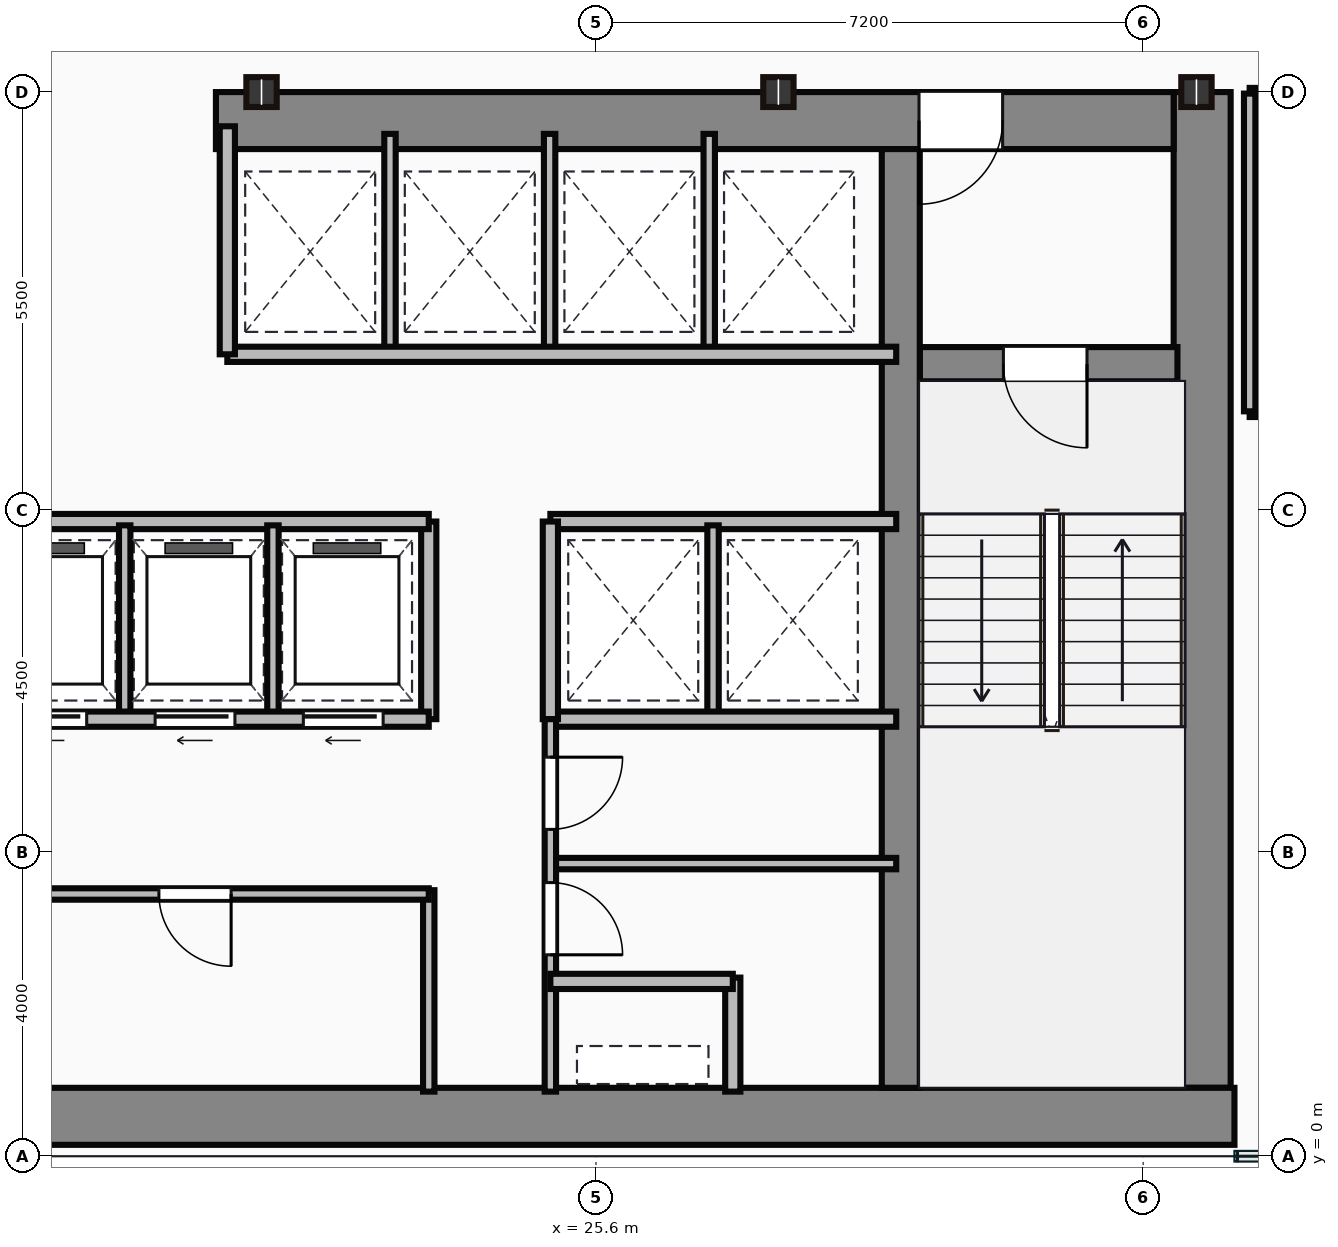
"""IFC4 building model, lengths in metres.
Left out: names, types, materials, properties, quantities, classifications, styles, units other than length and angle.
Written with IfcOpenShell. Run it as: python <this file> out.ifc"""

import sys

from ifc_helpers import new_model, si_unit, direction, frame, frame_2d, origin, origin_2d, place, context, subcontext, project, spatial, rectangle, i_section, extrude, source, transform, mapped, element, fill, save


model = new_model("IFC4")
c1 = context("Model", 3, precision=1e-05, world=origin(), true_north=direction((0.0, 1.0)))
c2 = subcontext(c1, "Body", "Model", "MODEL_VIEW")
j1 = project(units=[si_unit("LENGTHUNIT", "METRE"), si_unit("PLANEANGLEUNIT", "RADIAN")], contexts=[c1])
p1 = place(None, origin())
s1 = spatial("IfcSite", under=j1, at=p1, CompositionType="ELEMENT")
p2 = place(p1, origin())
s2 = spatial("IfcBuilding", under=s1, at=p2, CompositionType="ELEMENT")
p3 = place(p2, frame((0.0, 0.0, 95.95)))
s3 = spatial("IfcBuildingStorey", under=s2, at=p3, CompositionType="ELEMENT", Elevation=95.95)
m1 = source(origin(), c2, "Body", "SweptSolid", [
    extrude(rectangle(XDim=29.5, YDim=0.75, at=frame_2d((14.75, 0.0))), origin(), (0.0, 0.0, 1.0), 3.65),
])
p4 = place(p3, frame((4.5, 0.525, 0.0), z_axis=(0.0, 0.0, 1.0), x_axis=(1.0, 0.0, 0.0)))
e1 = element("IfcWall", 1, at=p4, inside=s3, PredefinedType="SHEAR", context=c2, shape_type="MappedRepresentation", body=[
    mapped(m1, transform((0.0, 0.0, 0.0))),
])
m2 = source(origin(), c2, "Body", "SweptSolid", [
    extrude(rectangle(XDim=13.1, YDim=0.75, at=frame_2d((6.55, 0.0))), origin(), (0.0, 0.0, 1.0), 3.65),
])
p5 = place(p3, frame((33.575, 0.9, 0.0), z_axis=(0.0, 0.0, 1.0), x_axis=(0.0, 1.0, 0.0)))
e2 = element("IfcWall", 2, at=p5, inside=s3, PredefinedType="SHEAR", context=c2, shape_type="MappedRepresentation", body=[
    mapped(m2, transform((0.0, 0.0, 0.0))),
])
m3 = source(origin(), c2, "Body", "SweptSolid", [
    extrude(rectangle(XDim=12.6, YDim=0.75, at=frame_2d((6.3, 0.0))), origin(), (0.0, 0.0, 1.0), 3.65),
])
p6 = place(p3, frame((20.6, 13.625, 0.0), z_axis=(0.0, 0.0, 1.0), x_axis=(1.0, 0.0, 0.0)))
e3 = element("IfcWall", 3, at=p6, inside=s3, PredefinedType="SHEAR", context=c2, shape_type="MappedRepresentation", body=[
    mapped(m3, transform((0.0, 0.0, 0.0))),
])
p7 = place(p6, frame((9.25, 0.0, 0.0)))
e4 = element("IfcOpeningElement", 4, at=p7, cuts=e3, PredefinedType="OPENING", context=c2, shape_type="SweptSolid", body=[
    extrude(rectangle(XDim=1.1, YDim=2.15, at=frame_2d((0.55, 1.075))), frame((0.0, 0.385, 0.0), z_axis=(0.0, -1.0, 0.0), x_axis=(1.0, 0.0, 0.0)), (0.0, 0.0, 1.0), 0.77),
])
m4 = source(origin(), c2, "Body", "SweptSolid", [
    extrude(rectangle(XDim=12.35, YDim=0.5, at=frame_2d((6.175, 0.0))), origin(), (0.0, 0.0, 1.0), 3.65),
])
p8 = place(p3, frame((29.61, 0.9, 0.0), z_axis=(0.0, 0.0, 1.0), x_axis=(0.0, 1.0, 0.0)))
e5 = element("IfcWall", 5, at=p8, inside=s3, PredefinedType="SHEAR", context=c2, shape_type="MappedRepresentation", body=[
    mapped(m4, transform((0.0, 0.0, 0.0))),
])
m5 = source(origin(), c2, "Body", "SweptSolid", [
    extrude(rectangle(XDim=3.39, YDim=0.45, at=frame_2d((1.695, 0.0))), origin(), (0.0, 0.0, 1.0), 3.65),
])
p9 = place(p3, frame((29.86, 10.42, 0.0), z_axis=(0.0, 0.0, 1.0), x_axis=(1.0, 0.0, 0.0)))
e6 = element("IfcWall", 6, at=p9, inside=s3, PredefinedType="SHEAR", context=c2, shape_type="MappedRepresentation", body=[
    mapped(m5, transform((0.0, 0.0, 0.0))),
])
p10 = place(p9, frame((1.1, 0.0, 0.0)))
e7 = element("IfcOpeningElement", 7, at=p10, cuts=e6, PredefinedType="OPENING", context=c2, shape_type="SweptSolid", body=[
    extrude(rectangle(XDim=1.1, YDim=2.15, at=frame_2d((0.55, 1.075))), frame((0.0, 0.235, 0.0), z_axis=(0.0, -1.0, 0.0), x_axis=(1.0, 0.0, 0.0)), (0.0, 0.0, 1.0), 0.47),
])
m6 = source(origin(), c2, "Body", "SweptSolid", [
    extrude(i_section(OverallWidth=0.399, OverallDepth=0.393, WebThickness=0.023, FlangeThickness=0.037, at=origin_2d()), origin(), (0.0, 0.0, 1.0), 3.65),
])
for number, where, z_axis, x_axis in (
    (8, (21.2, 14.0, 0.0), (0.0, 0.0, 1.0), (1.0, 0.0, 0.0)),
    (9, (28.0, 14.0, 0.0), (0.0, 0.0, 1.0), (1.0, 0.0, 0.0)),
    (10, (33.5, 14.0, 0.0), (0.0, 0.0, 1.0), (1.0, 0.0, 0.0)),
):
    element("IfcColumn", number, at=place(p3, frame(where, z_axis=z_axis, x_axis=x_axis)), inside=s3, PredefinedType="COLUMN", context=c2, shape_type="MappedRepresentation", body=[
        mapped(m6, transform((0.0, 0.0, 0.0))),
    ])
m7 = source(origin(), c2, "Body", "SweptSolid", [
    extrude(rectangle(XDim=10.35, YDim=0.15, at=frame_2d((5.175, 0.0))), origin(), (0.0, 0.0, 1.0), 3.4),
])
p11 = place(p3, frame((13.05, 3.45, 0.0), z_axis=(0.0, 0.0, 1.0), x_axis=(1.0, 0.0, 0.0)))
e11 = element("IfcWall", 11, at=p11, inside=s3, PredefinedType="PARTITIONING", context=c2, shape_type="MappedRepresentation", body=[
    mapped(m7, transform((0.0, 0.0, 0.0))),
])
p12 = place(p11, frame((2.1, 0.0, 0.0)))
e12 = element("IfcOpeningElement", 12, at=p12, cuts=e11, PredefinedType="OPENING", context=c2, shape_type="SweptSolid", body=[
    extrude(rectangle(XDim=0.95, YDim=2.15, at=frame_2d((0.475, 1.075))), frame((0.0, 0.085, 0.0), z_axis=(0.0, -1.0, 0.0), x_axis=(1.0, 0.0, 0.0)), (0.0, 0.0, 1.0), 0.17),
])
p13 = place(p11, frame((6.8, 0.0, 0.0)))
e13 = element("IfcOpeningElement", 13, at=p13, cuts=e11, PredefinedType="OPENING", context=c2, shape_type="SweptSolid", body=[
    extrude(rectangle(XDim=0.95, YDim=2.15, at=frame_2d((0.475, 1.075))), frame((0.0, 0.085, 0.0), z_axis=(0.0, -1.0, 0.0), x_axis=(1.0, 0.0, 0.0)), (0.0, 0.0, 1.0), 0.17),
])
m8 = source(origin(), c2, "Body", "SweptSolid", [
    extrude(rectangle(XDim=2.65, YDim=0.15, at=frame_2d((1.325, 0.0))), origin(), (0.0, 0.0, 1.0), 3.4),
])
p14 = place(p3, frame((23.4, 0.85, 0.0), z_axis=(0.0, 0.0, 1.0), x_axis=(0.0, 1.0, 0.0)))
e14 = element("IfcWall", 14, at=p14, inside=s3, PredefinedType="PARTITIONING", context=c2, shape_type="MappedRepresentation", body=[
    mapped(m8, transform((0.0, 0.0, 0.0))),
])
m9 = source(origin(), c2, "Body", "SweptSolid", [
    extrude(rectangle(XDim=11.85, YDim=0.2, at=frame_2d((5.925, 0.0))), origin(), (0.0, 0.0, 1.0), 3.4),
])
p15 = place(p3, frame((11.55, 5.75, 0.0), z_axis=(0.0, 0.0, 1.0), x_axis=(1.0, 0.0, 0.0)))
e15 = element("IfcWall", 15, at=p15, inside=s3, PredefinedType="PARTITIONING", context=c2, shape_type="MappedRepresentation", body=[
    mapped(m9, transform((0.0, 0.0, 0.0))),
])
p16 = place(p15, frame((0.45, 0.0, 0.0)))
e16 = element("IfcOpeningElement", 16, at=p16, cuts=e15, PredefinedType="OPENING", context=c2, shape_type="SweptSolid", body=[
    extrude(rectangle(XDim=1.05, YDim=2.15, at=frame_2d((0.525, 1.075))), frame((0.0, 0.11, 0.0), z_axis=(0.0, -1.0, 0.0), x_axis=(1.0, 0.0, 0.0)), (0.0, 0.0, 1.0), 0.22),
])
p17 = place(p15, frame((2.4, 0.0, 0.0)))
e17 = element("IfcOpeningElement", 17, at=p17, cuts=e15, PredefinedType="OPENING", context=c2, shape_type="SweptSolid", body=[
    extrude(rectangle(XDim=1.05, YDim=2.15, at=frame_2d((0.525, 1.075))), frame((0.0, 0.11, 0.0), z_axis=(0.0, -1.0, 0.0), x_axis=(1.0, 0.0, 0.0)), (0.0, 0.0, 1.0), 0.22),
])
p18 = place(p15, frame((4.35, 0.0, 0.0)))
e18 = element("IfcOpeningElement", 18, at=p18, cuts=e15, PredefinedType="OPENING", context=c2, shape_type="SweptSolid", body=[
    extrude(rectangle(XDim=1.05, YDim=2.15, at=frame_2d((0.525, 1.075))), frame((0.0, 0.11, 0.0), z_axis=(0.0, -1.0, 0.0), x_axis=(1.0, 0.0, 0.0)), (0.0, 0.0, 1.0), 0.22),
])
p19 = place(p15, frame((6.3, 0.0, 0.0)))
e19 = element("IfcOpeningElement", 19, at=p19, cuts=e15, PredefinedType="OPENING", context=c2, shape_type="SweptSolid", body=[
    extrude(rectangle(XDim=1.05, YDim=2.15, at=frame_2d((0.525, 1.075))), frame((0.0, 0.11, 0.0), z_axis=(0.0, -1.0, 0.0), x_axis=(1.0, 0.0, 0.0)), (0.0, 0.0, 1.0), 0.22),
])
p20 = place(p15, frame((8.25, 0.0, 0.0)))
e20 = element("IfcOpeningElement", 20, at=p20, cuts=e15, PredefinedType="OPENING", context=c2, shape_type="SweptSolid", body=[
    extrude(rectangle(XDim=1.05, YDim=2.15, at=frame_2d((0.525, 1.075))), frame((0.0, 0.11, 0.0), z_axis=(0.0, -1.0, 0.0), x_axis=(1.0, 0.0, 0.0)), (0.0, 0.0, 1.0), 0.22),
])
p21 = place(p15, frame((10.2, 0.0, 0.0)))
e21 = element("IfcOpeningElement", 21, at=p21, cuts=e15, PredefinedType="OPENING", context=c2, shape_type="SweptSolid", body=[
    extrude(rectangle(XDim=1.05, YDim=2.15, at=frame_2d((0.525, 1.075))), frame((0.0, 0.11, 0.0), z_axis=(0.0, -1.0, 0.0), x_axis=(1.0, 0.0, 0.0)), (0.0, 0.0, 1.0), 0.22),
])
p22 = place(p3, frame((11.55, 8.35, 0.0), z_axis=(0.0, 0.0, 1.0), x_axis=(1.0, 0.0, 0.0)))
e22 = element("IfcWall", 22, at=p22, inside=s3, PredefinedType="PARTITIONING", context=c2, shape_type="MappedRepresentation", body=[
    mapped(m9, transform((0.0, 0.0, 0.0))),
])
m10 = source(origin(), c2, "Body", "SweptSolid", [
    extrude(rectangle(XDim=2.6, YDim=0.2, at=frame_2d((1.3, 0.0))), origin(), (0.0, 0.0, 1.0), 3.4),
])
p23 = place(p3, frame((23.4, 5.75, 0.0), z_axis=(0.0, 0.0, 1.0), x_axis=(0.0, 1.0, 0.0)))
e23 = element("IfcWall", 23, at=p23, inside=s3, PredefinedType="PARTITIONING", context=c2, shape_type="MappedRepresentation", body=[
    mapped(m10, transform((0.0, 0.0, 0.0))),
])
m11 = source(origin(), c2, "Body", "SweptSolid", [
    extrude(rectangle(XDim=2.5, YDim=0.15, at=frame_2d((1.25, 0.0))), origin(), (0.0, 0.0, 1.0), 3.4),
])
for number, where, z_axis, x_axis in (
    (24, (19.4, 5.8, 0.0), (0.0, 0.0, 1.0), (0.0, 1.0, 0.0)),
    (25, (21.35, 5.8, 0.0), (0.0, 0.0, 1.0), (0.0, 1.0, 0.0)),
):
    element("IfcWall", number, at=place(p3, frame(where, z_axis=z_axis, x_axis=x_axis)), inside=s3, PredefinedType="PARTITIONING", context=c2, shape_type="MappedRepresentation", body=[
        mapped(m11, transform((0.0, 0.0, 0.0))),
    ])
m12 = source(origin(), c2, "Body", "SweptSolid", [
    extrude(rectangle(XDim=8.8, YDim=0.2, at=frame_2d((4.4, 0.0))), origin(), (0.0, 0.0, 1.0), 3.4),
])
p24 = place(p3, frame((20.75, 10.55, 0.0), z_axis=(0.0, 0.0, 1.0), x_axis=(1.0, 0.0, 0.0)))
e26 = element("IfcWall", 26, at=p24, inside=s3, PredefinedType="PARTITIONING", context=c2, shape_type="MappedRepresentation", body=[
    mapped(m12, transform((0.0, 0.0, 0.0))),
])
m13 = source(origin(), c2, "Body", "SweptSolid", [
    extrude(rectangle(XDim=3.0, YDim=0.2, at=frame_2d((1.5, 0.0))), origin(), (0.0, 0.0, 1.0), 3.4),
])
p25 = place(p3, frame((20.75, 10.55, 0.0), z_axis=(0.0, 0.0, 1.0), x_axis=(0.0, 1.0, 0.0)))
e27 = element("IfcWall", 27, at=p25, inside=s3, PredefinedType="PARTITIONING", context=c2, shape_type="MappedRepresentation", body=[
    mapped(m13, transform((0.0, 0.0, 0.0))),
])
m14 = source(origin(), c2, "Body", "SweptSolid", [
    extrude(rectangle(XDim=2.85, YDim=0.15, at=frame_2d((1.425, 0.0))), origin(), (0.0, 0.0, 1.0), 3.4),
])
for number, where, z_axis, x_axis in (
    (28, (22.89, 10.6, 0.0), (0.0, 0.0, 1.0), (0.0, 1.0, 0.0)),
    (29, (24.99, 10.6, 0.0), (0.0, 0.0, 1.0), (0.0, 1.0, 0.0)),
    (30, (27.09, 10.6, 0.0), (0.0, 0.0, 1.0), (0.0, 1.0, 0.0)),
):
    element("IfcWall", number, at=place(p3, frame(where, z_axis=z_axis, x_axis=x_axis)), inside=s3, PredefinedType="PARTITIONING", context=c2, shape_type="MappedRepresentation", body=[
        mapped(m14, transform((0.0, 0.0, 0.0))),
    ])
m15 = source(origin(), c2, "Body", "SweptSolid", [
    extrude(rectangle(XDim=4.55, YDim=0.2, at=frame_2d((2.275, 0.0))), origin(), (0.0, 0.0, 1.0), 3.4),
])
for number, where, z_axis, x_axis in (
    (31, (25.0, 8.35, 0.0), (0.0, 0.0, 1.0), (1.0, 0.0, 0.0)),
    (32, (25.0, 5.75, 0.0), (0.0, 0.0, 1.0), (1.0, 0.0, 0.0)),
):
    element("IfcWall", number, at=place(p3, frame(where, z_axis=z_axis, x_axis=x_axis)), inside=s3, PredefinedType="PARTITIONING", context=c2, shape_type="MappedRepresentation", body=[
        mapped(m15, transform((0.0, 0.0, 0.0))),
    ])
p26 = place(p3, frame((25.0, 5.75, 0.0), z_axis=(0.0, 0.0, 1.0), x_axis=(0.0, 1.0, 0.0)))
e33 = element("IfcWall", 33, at=p26, inside=s3, PredefinedType="PARTITIONING", context=c2, shape_type="MappedRepresentation", body=[
    mapped(m10, transform((0.0, 0.0, 0.0))),
])
p27 = place(p3, frame((27.14, 5.8, 0.0), z_axis=(0.0, 0.0, 1.0), x_axis=(0.0, 1.0, 0.0)))
e34 = element("IfcWall", 34, at=p27, inside=s3, PredefinedType="PARTITIONING", context=c2, shape_type="MappedRepresentation", body=[
    mapped(m11, transform((0.0, 0.0, 0.0))),
])
m16 = source(origin(), c2, "Body", "SweptSolid", [
    extrude(rectangle(XDim=4.9, YDim=0.15, at=frame_2d((2.45, 0.0))), origin(), (0.0, 0.0, 1.0), 3.4),
])
p28 = place(p3, frame((25.0, 0.85, 0.0), z_axis=(0.0, 0.0, 1.0), x_axis=(0.0, 1.0, 0.0)))
e35 = element("IfcWall", 35, at=p28, inside=s3, PredefinedType="PARTITIONING", context=c2, shape_type="MappedRepresentation", body=[
    mapped(m16, transform((0.0, 0.0, 0.0))),
])
p29 = place(p28, frame((1.8, 0.0, 0.0)))
e36 = element("IfcOpeningElement", 36, at=p29, cuts=e35, PredefinedType="OPENING", context=c2, shape_type="SweptSolid", body=[
    extrude(rectangle(XDim=0.95, YDim=2.15, at=frame_2d((0.475, 1.075))), frame((0.0, 0.085, 0.0), z_axis=(0.0, -1.0, 0.0), x_axis=(1.0, 0.0, 0.0)), (0.0, 0.0, 1.0), 0.17),
])
p30 = place(p28, frame((3.45, 0.0, 0.0)))
e37 = element("IfcOpeningElement", 37, at=p30, cuts=e35, PredefinedType="OPENING", context=c2, shape_type="SweptSolid", body=[
    extrude(rectangle(XDim=0.95, YDim=2.15, at=frame_2d((0.475, 1.075))), frame((0.0, 0.085, 0.0), z_axis=(0.0, -1.0, 0.0), x_axis=(1.0, 0.0, 0.0)), (0.0, 0.0, 1.0), 0.17),
])
m17 = source(origin(), c2, "Body", "SweptSolid", [
    extrude(rectangle(XDim=2.4, YDim=0.2, at=frame_2d((1.2, 0.0))), origin(), (0.0, 0.0, 1.0), 3.4),
])
p31 = place(p3, frame((25.0, 2.3, 0.0), z_axis=(0.0, 0.0, 1.0), x_axis=(1.0, 0.0, 0.0)))
e38 = element("IfcWall", 38, at=p31, inside=s3, PredefinedType="PARTITIONING", context=c2, shape_type="MappedRepresentation", body=[
    mapped(m17, transform((0.0, 0.0, 0.0))),
])
m18 = source(origin(), c2, "Body", "SweptSolid", [
    extrude(rectangle(XDim=1.5, YDim=0.2, at=frame_2d((0.75, 0.0))), origin(), (0.0, 0.0, 1.0), 3.4),
])
p32 = place(p3, frame((27.4, 0.85, 0.0), z_axis=(0.0, 0.0, 1.0), x_axis=(0.0, 1.0, 0.0)))
e39 = element("IfcWall", 39, at=p32, inside=s3, PredefinedType="PARTITIONING", context=c2, shape_type="MappedRepresentation", body=[
    mapped(m18, transform((0.0, 0.0, 0.0))),
])
m19 = source(origin(), c2, "Body", "SweptSolid", [
    extrude(rectangle(XDim=4.55, YDim=0.15, at=frame_2d((2.275, 0.0))), origin(), (0.0, 0.0, 1.0), 3.4),
])
p33 = place(p3, frame((25.0, 3.85, 0.0), z_axis=(0.0, 0.0, 1.0), x_axis=(1.0, 0.0, 0.0)))
e40 = element("IfcWall", 40, at=p33, inside=s3, PredefinedType="PARTITIONING", context=c2, shape_type="MappedRepresentation", body=[
    mapped(m19, transform((0.0, 0.0, 0.0))),
])
m20 = source(origin(), c2, "Body", "SweptSolid", [
    extrude(rectangle(XDim=4.8, YDim=0.15, at=frame_2d((2.4, 0.0))), origin(), (0.0, 0.0, 1.0), 2.702),
])
p34 = place(p3, frame((34.2, 13.98, 0.0), z_axis=(0.0, 0.0, 1.0), x_axis=(1.0, 0.0, 0.0)))
e41 = element("IfcWall", 41, at=p34, inside=s3, PredefinedType="PARTITIONING", context=c2, shape_type="MappedRepresentation", body=[
    mapped(m20, transform((0.0, 0.0, 0.0))),
])
p35 = place(p34, frame((0.35, 0.0, 0.0)))
e42 = element("IfcOpeningElement", 42, at=p35, cuts=e41, PredefinedType="OPENING", context=c2, shape_type="SweptSolid", body=[
    extrude(rectangle(XDim=0.85, YDim=2.1, at=frame_2d((0.425, 1.05))), frame((0.0, 0.085, 0.0), z_axis=(0.0, -1.0, 0.0), x_axis=(1.0, 0.0, 0.0)), (0.0, 0.0, 1.0), 0.17),
])
p36 = place(p34, frame((1.95, 0.0, 0.0)))
e43 = element("IfcOpeningElement", 43, at=p36, cuts=e41, PredefinedType="OPENING", context=c2, shape_type="SweptSolid", body=[
    extrude(rectangle(XDim=0.85, YDim=2.1, at=frame_2d((0.425, 1.05))), frame((0.0, 0.085, 0.0), z_axis=(0.0, -1.0, 0.0), x_axis=(1.0, 0.0, 0.0)), (0.0, 0.0, 1.0), 0.17),
])
p37 = place(p34, frame((3.5, 0.0, 0.0)))
e44 = element("IfcOpeningElement", 44, at=p37, cuts=e41, PredefinedType="OPENING", context=c2, shape_type="SweptSolid", body=[
    extrude(rectangle(XDim=0.9, YDim=2.1, at=frame_2d((0.45, 1.05))), frame((0.0, 0.085, 0.0), z_axis=(0.0, -1.0, 0.0), x_axis=(1.0, 0.0, 0.0)), (0.0, 0.0, 1.0), 0.17),
])
m21 = source(origin(), c2, "Body", "SweptSolid", [
    extrude(rectangle(XDim=4.8, YDim=0.15, at=frame_2d((2.4, 0.0))), origin(), (0.0, 0.0, 1.0), 3.4),
])
p38 = place(p3, frame((34.2, 9.8, 0.0), z_axis=(0.0, 0.0, 1.0), x_axis=(1.0, 0.0, 0.0)))
e45 = element("IfcWall", 45, at=p38, inside=s3, PredefinedType="PARTITIONING", context=c2, shape_type="MappedRepresentation", body=[
    mapped(m21, transform((0.0, 0.0, 0.0))),
])
m22 = source(origin(), c2, "Body", "SweptSolid", [
    extrude(rectangle(XDim=4.18, YDim=0.15, at=frame_2d((2.09, 0.0))), origin(), (0.0, 0.0, 1.0), 3.4),
])
p39 = place(p3, frame((34.2, 9.8, 0.0), z_axis=(0.0, 0.0, 1.0), x_axis=(0.0, 1.0, 0.0)))
e46 = element("IfcWall", 46, at=p39, inside=s3, PredefinedType="PARTITIONING", context=c2, shape_type="MappedRepresentation", body=[
    mapped(m22, transform((0.0, 0.0, 0.0))),
])
m23 = source(origin(), c2, "Body", "SweptSolid", [
    extrude(rectangle(XDim=1.1, YDim=2.15, at=frame_2d((0.55, 1.075))), frame((0.0, 0.025, 0.0), z_axis=(0.0, -1.0, 0.0), x_axis=(1.0, 0.0, 0.0)), (0.0, 0.0, 1.0), 0.05),
])
p40 = place(p10, frame((1.1, 0.0, 0.0), z_axis=(0.0, 0.0, 1.0), x_axis=(-1.0, 0.0, 0.0)))
e47 = element("IfcDoor", 47, at=p40, inside=s3, OperationType="SINGLE_SWING_RIGHT", PredefinedType="DOOR", context=c2, shape_type="MappedRepresentation", body=[
    mapped(m23, transform((0.0, 0.0, 0.0))),
])
fill(e7, e47)
p41 = place(p7, origin())
e48 = element("IfcDoor", 48, at=p41, inside=s3, OperationType="SINGLE_SWING_LEFT", PredefinedType="DOOR", context=c2, shape_type="MappedRepresentation", body=[
    mapped(m23, transform((0.0, 0.0, 0.0))),
])
fill(e4, e48)
m24 = source(origin(), c2, "Body", "SweptSolid", [
    extrude(rectangle(XDim=0.95, YDim=2.15, at=frame_2d((0.475, 1.075))), frame((0.0, 0.025, 0.0), z_axis=(0.0, -1.0, 0.0), x_axis=(1.0, 0.0, 0.0)), (0.0, 0.0, 1.0), 0.05),
])
p42 = place(p13, origin())
e49 = element("IfcDoor", 49, at=p42, inside=s3, OperationType="SINGLE_SWING_RIGHT", PredefinedType="DOOR", context=c2, shape_type="MappedRepresentation", body=[
    mapped(m24, transform((0.0, 0.0, 0.0))),
])
fill(e13, e49)
m25 = source(origin(), c2, "Body", "SweptSolid", [
    extrude(rectangle(XDim=1.05, YDim=2.15, at=frame_2d((0.525, 1.075))), frame((0.0, 0.025, 0.0), z_axis=(0.0, -1.0, 0.0), x_axis=(1.0, 0.0, 0.0)), (0.0, 0.0, 1.0), 0.05),
])
p43 = place(p19, frame((1.05, 0.0, 0.0), z_axis=(0.0, 0.0, 1.0), x_axis=(-1.0, 0.0, 0.0)))
e50 = element("IfcDoor", 50, at=p43, inside=s3, OperationType="SLIDING_TO_LEFT", PredefinedType="DOOR", context=c2, shape_type="MappedRepresentation", body=[
    mapped(m25, transform((0.0, 0.0, 0.0))),
])
fill(e19, e50)
p44 = place(p20, frame((1.05, 0.0, 0.0), z_axis=(0.0, 0.0, 1.0), x_axis=(-1.0, 0.0, 0.0)))
e51 = element("IfcDoor", 51, at=p44, inside=s3, OperationType="SLIDING_TO_LEFT", PredefinedType="DOOR", context=c2, shape_type="MappedRepresentation", body=[
    mapped(m25, transform((0.0, 0.0, 0.0))),
])
fill(e20, e51)
p45 = place(p21, frame((1.05, 0.0, 0.0), z_axis=(0.0, 0.0, 1.0), x_axis=(-1.0, 0.0, 0.0)))
e52 = element("IfcDoor", 52, at=p45, inside=s3, OperationType="SLIDING_TO_LEFT", PredefinedType="DOOR", context=c2, shape_type="MappedRepresentation", body=[
    mapped(m25, transform((0.0, 0.0, 0.0))),
])
fill(e21, e52)
p46 = place(p29, origin())
e53 = element("IfcDoor", 53, at=p46, inside=s3, OperationType="SINGLE_SWING_LEFT", PredefinedType="DOOR", context=c2, shape_type="MappedRepresentation", body=[
    mapped(m24, transform((0.0, 0.0, 0.0))),
])
fill(e36, e53)
p47 = place(p30, origin())
e54 = element("IfcDoor", 54, at=p47, inside=s3, OperationType="SINGLE_SWING_RIGHT", PredefinedType="DOOR", context=c2, shape_type="MappedRepresentation", body=[
    mapped(m24, transform((0.0, 0.0, 0.0))),
])
fill(e37, e54)
save(model, sys.argv[1])
